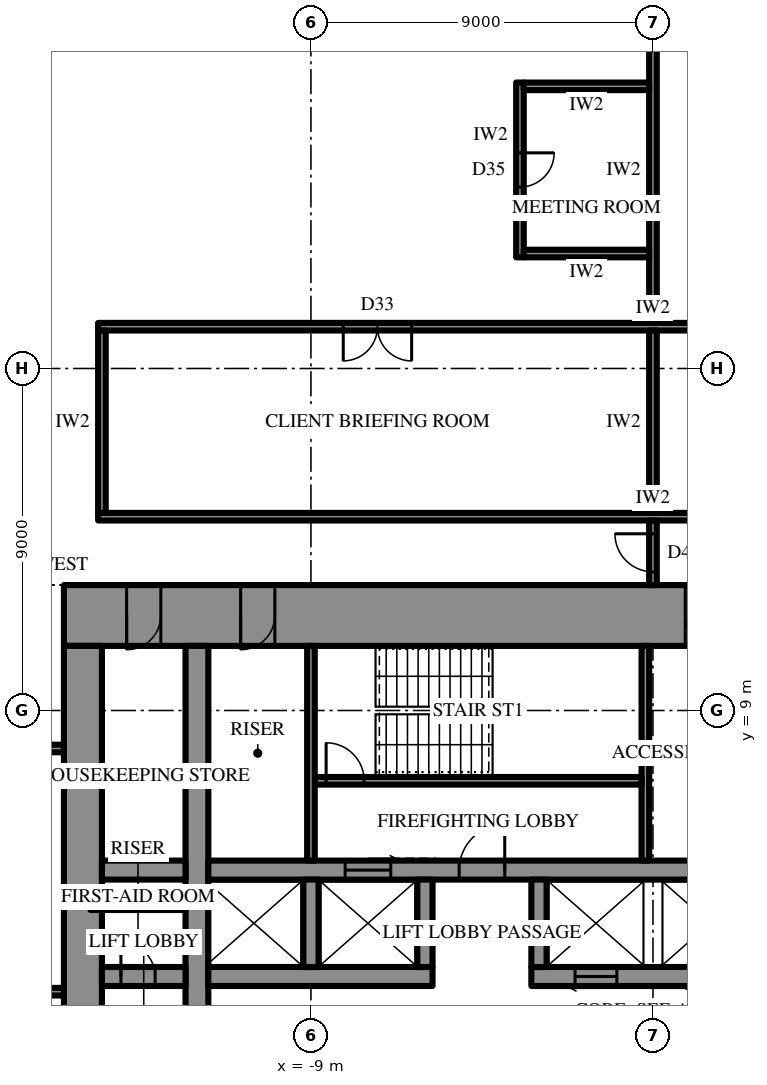
"""IFC4 building model, lengths in metres.
Left out: names, types, materials, properties, quantities, classifications, styles, units other than length and angle.
Written with IfcOpenShell. Run it as: python <this file> out.ifc"""

import sys

from ifc_helpers import new_model, si_unit, direction, frame, frame_2d, origin, place, context, subcontext, project, spatial, polyline, rectangle, outline, extrude, element, fill, save


model = new_model("IFC4")
c1 = context("Model", 3, precision=1e-05, world=origin(), true_north=direction((0.0, 1.0)))
c2 = subcontext(c1, "Body", "Model", "MODEL_VIEW")
j1 = project(units=[si_unit("LENGTHUNIT", "METRE"), si_unit("PLANEANGLEUNIT", "RADIAN")], contexts=[c1])
p1 = place(None, origin())
s1 = spatial("IfcSite", under=j1, at=p1, CompositionType="ELEMENT")
p2 = place(p1, origin())
s2 = spatial("IfcBuilding", under=s1, at=p2, CompositionType="ELEMENT")
p3 = place(p2, frame((0.0, 0.0, 215.5)))
s3 = spatial("IfcBuildingStorey", under=s2, at=p3, CompositionType="ELEMENT", Elevation=215.5)
p4 = place(p3, frame((-15.5, 11.5, 0.0), z_axis=(0.0, 0.0, 1.0), x_axis=(1.0, 0.0, 0.0)))
e1 = element("IfcWall", 1, at=p4, inside=s3, PredefinedType="SHEAR", context=c2, shape_type="SweptSolid", body=[
    extrude(rectangle(XDim=31.0, YDim=1.6, at=frame_2d((15.5, 0.0))), origin(), (0.0, 0.0, 1.0), 4.2),
])
p5 = place(p4, frame((16.35, 0.0, 0.0)))
e2 = element("IfcOpeningElement", 2, at=p5, cuts=e1, PredefinedType="OPENING", context=c2, shape_type="SweptSolid", body=[
    extrude(rectangle(XDim=0.9, YDim=2.2, at=frame_2d((0.45, 1.1))), frame((0.0, 0.81, 0.0), z_axis=(0.0, -1.0, 0.0), x_axis=(1.0, 0.0, 0.0)), (0.0, 0.0, 1.0), 1.62),
])
p6 = place(p4, frame((19.35, 0.0, 0.0)))
e3 = element("IfcOpeningElement", 3, at=p6, cuts=e1, PredefinedType="OPENING", context=c2, shape_type="SweptSolid", body=[
    extrude(rectangle(XDim=0.9, YDim=2.2, at=frame_2d((0.45, 1.1))), frame((0.0, 0.81, 0.0), z_axis=(0.0, -1.0, 0.0), x_axis=(1.0, 0.0, 0.0)), (0.0, 0.0, 1.0), 1.62),
])
p7 = place(p4, frame((22.4, 0.0, 0.0)))
e4 = element("IfcOpeningElement", 4, at=p7, cuts=e1, PredefinedType="OPENING", context=c2, shape_type="SweptSolid", body=[
    extrude(rectangle(XDim=1.0, YDim=2.2, at=frame_2d((0.5, 1.1))), frame((0.0, 0.81, 0.0), z_axis=(0.0, -1.0, 0.0), x_axis=(1.0, 0.0, 0.0)), (0.0, 0.0, 1.0), 1.62),
])
p8 = place(p4, frame((1.65, 0.0, 0.0)))
e5 = element("IfcOpeningElement", 5, at=p8, cuts=e1, PredefinedType="OPENING", context=c2, shape_type="SweptSolid", body=[
    extrude(rectangle(XDim=0.9, YDim=2.2, at=frame_2d((0.45, 1.1))), frame((0.0, 0.81, 0.0), z_axis=(0.0, -1.0, 0.0), x_axis=(1.0, 0.0, 0.0)), (0.0, 0.0, 1.0), 1.62),
])
p9 = place(p4, frame((4.65, 0.0, 0.0)))
e6 = element("IfcOpeningElement", 6, at=p9, cuts=e1, PredefinedType="OPENING", context=c2, shape_type="SweptSolid", body=[
    extrude(rectangle(XDim=0.9, YDim=2.2, at=frame_2d((0.45, 1.1))), frame((0.0, 0.81, 0.0), z_axis=(0.0, -1.0, 0.0), x_axis=(1.0, 0.0, 0.0)), (0.0, 0.0, 1.0), 1.62),
])
p10 = place(p4, frame((25.45, 0.0, 0.0)))
e7 = element("IfcOpeningElement", 7, at=p10, cuts=e1, PredefinedType="OPENING", context=c2, shape_type="SweptSolid", body=[
    extrude(rectangle(XDim=0.9, YDim=2.2, at=frame_2d((0.45, 1.1))), frame((0.0, 0.81, 0.0), z_axis=(0.0, -1.0, 0.0), x_axis=(1.0, 0.0, 0.0)), (0.0, 0.0, 1.0), 1.62),
])
p11 = place(p4, frame((28.45, 0.0, 0.0)))
e8 = element("IfcOpeningElement", 8, at=p11, cuts=e1, PredefinedType="OPENING", context=c2, shape_type="SweptSolid", body=[
    extrude(rectangle(XDim=0.9, YDim=2.2, at=frame_2d((0.45, 1.1))), frame((0.0, 0.81, 0.0), z_axis=(0.0, -1.0, 0.0), x_axis=(1.0, 0.0, 0.0)), (0.0, 0.0, 1.0), 1.62),
])
p12 = place(p3, frame((-15.0, 10.7, 0.0), z_axis=(0.0, 0.0, 1.0), x_axis=(0.0, -1.0, 0.0)))
e9 = element("IfcWall", 9, at=p12, inside=s3, PredefinedType="SHEAR", context=c2, shape_type="SweptSolid", body=[
    extrude(rectangle(XDim=21.4, YDim=1.0, at=frame_2d((10.7, 0.0))), origin(), (0.0, 0.0, 1.0), 4.2),
])
p13 = place(p12, frame((9.8, 0.0, 0.0)))
e10 = element("IfcOpeningElement", 10, at=p13, cuts=e9, PredefinedType="OPENING", context=c2, shape_type="SweptSolid", body=[
    extrude(rectangle(XDim=1.8, YDim=2.4, at=frame_2d((0.9, 1.2))), frame((0.0, 0.51, 0.0), z_axis=(0.0, -1.0, 0.0), x_axis=(1.0, 0.0, 0.0)), (0.0, 0.0, 1.0), 1.02),
])
p14 = place(p3, frame((-12.0, -10.7, 0.0), z_axis=(0.0, 0.0, 1.0), x_axis=(0.0, 1.0, 0.0)))
e11 = element("IfcWall", 11, at=p14, inside=s3, PredefinedType="SHEAR", context=c2, shape_type="SweptSolid", body=[
    extrude(rectangle(XDim=21.4, YDim=0.6, at=frame_2d((10.7, 0.0))), origin(), (0.0, 0.0, 1.0), 4.2),
])
p15 = place(p14, frame((9.8, 0.0, 0.0)))
e12 = element("IfcOpeningElement", 12, at=p15, cuts=e11, PredefinedType="OPENING", context=c2, shape_type="SweptSolid", body=[
    extrude(rectangle(XDim=1.8, YDim=2.4, at=frame_2d((0.9, 1.2))), frame((0.0, 0.31, 0.0), z_axis=(0.0, -1.0, 0.0), x_axis=(1.0, 0.0, 0.0)), (0.0, 0.0, 1.0), 0.62),
])
p16 = place(p3, frame((-14.5, 2.0, 0.0), z_axis=(0.0, 0.0, 1.0), x_axis=(1.0, 0.0, 0.0)))
e13 = element("IfcWall", 13, at=p16, inside=s3, PredefinedType="SHEAR", context=c2, shape_type="SweptSolid", body=[
    extrude(rectangle(XDim=2.2, YDim=0.5, at=frame_2d((1.1, 0.0))), origin(), (0.0, 0.0, 1.0), 4.2),
])
p17 = place(p16, frame((0.5, 0.0, 0.0)))
e14 = element("IfcOpeningElement", 14, at=p17, cuts=e13, PredefinedType="OPENING", context=c2, shape_type="SweptSolid", body=[
    extrude(rectangle(XDim=0.9, YDim=2.2, at=frame_2d((0.45, 1.1))), frame((0.0, 0.26, 0.0), z_axis=(0.0, -1.0, 0.0), x_axis=(1.0, 0.0, 0.0)), (0.0, 0.0, 1.0), 0.52),
])
p18 = place(p3, frame((-11.7, 2.0, 0.0), z_axis=(0.0, 0.0, 1.0), x_axis=(1.0, 0.0, 0.0)))
e15 = element("IfcWall", 15, at=p18, inside=s3, PredefinedType="SHEAR", context=c2, shape_type="SweptSolid", body=[
    extrude(rectangle(XDim=5.9, YDim=0.5, at=frame_2d((2.95, 0.0))), origin(), (0.0, 0.0, 1.0), 4.2),
])
p19 = place(p3, frame((-3.2, 2.0, 0.0), z_axis=(0.0, 0.0, 1.0), x_axis=(1.0, 0.0, 0.0)))
e16 = element("IfcWall", 16, at=p19, inside=s3, PredefinedType="SHEAR", context=c2, shape_type="SweptSolid", body=[
    extrude(rectangle(XDim=14.9, YDim=0.5, at=frame_2d((7.45, 0.0))), origin(), (0.0, 0.0, 1.0), 4.2),
])
p20 = place(p19, frame((1.15, 0.0, 0.0)))
e17 = element("IfcOpeningElement", 17, at=p20, cuts=e16, PredefinedType="OPENING", context=c2, shape_type="SweptSolid", body=[
    extrude(rectangle(XDim=1.1, YDim=2.2, at=frame_2d((0.55, 1.1))), frame((0.0, 0.26, 0.0), z_axis=(0.0, -1.0, 0.0), x_axis=(1.0, 0.0, 0.0)), (0.0, 0.0, 1.0), 0.52),
])
p21 = place(p19, frame((4.15, 0.0, 0.0)))
e18 = element("IfcOpeningElement", 18, at=p21, cuts=e16, PredefinedType="OPENING", context=c2, shape_type="SweptSolid", body=[
    extrude(rectangle(XDim=1.1, YDim=2.2, at=frame_2d((0.55, 1.1))), frame((0.0, 0.26, 0.0), z_axis=(0.0, -1.0, 0.0), x_axis=(1.0, 0.0, 0.0)), (0.0, 0.0, 1.0), 0.52),
])
p22 = place(p19, frame((7.15, 0.0, 0.0)))
e19 = element("IfcOpeningElement", 19, at=p22, cuts=e16, PredefinedType="OPENING", context=c2, shape_type="SweptSolid", body=[
    extrude(rectangle(XDim=1.1, YDim=2.2, at=frame_2d((0.55, 1.1))), frame((0.0, 0.26, 0.0), z_axis=(0.0, -1.0, 0.0), x_axis=(1.0, 0.0, 0.0)), (0.0, 0.0, 1.0), 0.52),
])
p23 = place(p19, frame((10.15, 0.0, 0.0)))
e20 = element("IfcOpeningElement", 20, at=p23, cuts=e16, PredefinedType="OPENING", context=c2, shape_type="SweptSolid", body=[
    extrude(rectangle(XDim=1.1, YDim=2.2, at=frame_2d((0.55, 1.1))), frame((0.0, 0.26, 0.0), z_axis=(0.0, -1.0, 0.0), x_axis=(1.0, 0.0, 0.0)), (0.0, 0.0, 1.0), 0.52),
])
p24 = place(p3, frame((-14.5, 4.8, 0.0), z_axis=(0.0, 0.0, 1.0), x_axis=(1.0, 0.0, 0.0)))
e21 = element("IfcWall", 21, at=p24, inside=s3, PredefinedType="SHEAR", context=c2, shape_type="SweptSolid", body=[
    extrude(rectangle(XDim=2.2, YDim=0.5, at=frame_2d((1.1, 0.0))), origin(), (0.0, 0.0, 1.0), 4.2),
])
p25 = place(p3, frame((-11.7, 4.8, 0.0), z_axis=(0.0, 0.0, 1.0), x_axis=(1.0, 0.0, 0.0)))
e22 = element("IfcWall", 22, at=p25, inside=s3, PredefinedType="SHEAR", context=c2, shape_type="SweptSolid", body=[
    extrude(rectangle(XDim=23.4, YDim=0.5, at=frame_2d((11.7, 0.0))), origin(), (0.0, 0.0, 1.0), 4.2),
])
p26 = place(p25, frame((6.6, 0.0, 0.0)))
e23 = element("IfcOpeningElement", 23, at=p26, cuts=e22, PredefinedType="OPENING", context=c2, shape_type="SweptSolid", body=[
    extrude(rectangle(XDim=1.2, YDim=2.2, at=frame_2d((0.6, 1.1))), frame((0.0, 0.26, 0.0), z_axis=(0.0, -1.0, 0.0), x_axis=(1.0, 0.0, 0.0)), (0.0, 0.0, 1.0), 0.52),
])
p27 = place(p25, frame((3.6, 0.0, 0.0)))
e24 = element("IfcOpeningElement", 24, at=p27, cuts=e22, PredefinedType="OPENING", context=c2, shape_type="SweptSolid", body=[
    extrude(rectangle(XDim=1.2, YDim=2.2, at=frame_2d((0.6, 1.1))), frame((0.0, 0.26, 0.0), z_axis=(0.0, -1.0, 0.0), x_axis=(1.0, 0.0, 0.0)), (0.0, 0.0, 1.0), 0.52),
])
for number, where, z_axis, x_axis in (
    (25, (-9.0, 2.25, 0.0), (0.0, 0.0, 1.0), (0.0, 1.0, 0.0)),
    (26, (-6.0, 2.25, 0.0), (0.0, 0.0, 1.0), (0.0, 1.0, 0.0)),
    (27, (-3.0, 2.25, 0.0), (0.0, 0.0, 1.0), (0.0, 1.0, 0.0)),
):
    element("IfcWall", number, at=place(p3, frame(where, z_axis=z_axis, x_axis=x_axis)), inside=s3, PredefinedType="SHEAR", context=c2, shape_type="SweptSolid", body=[
        extrude(rectangle(XDim=2.3, YDim=0.4, at=frame_2d((1.15, 0.0))), origin(), (0.0, 0.0, 1.0), 4.2),
    ])
p28 = place(p3, frame((-0.2, 5.05, 0.0), z_axis=(0.0, 0.0, 1.0), x_axis=(0.0, 1.0, 0.0)))
e28 = element("IfcWall", 28, at=p28, inside=s3, PredefinedType="SHEAR", context=c2, shape_type="SweptSolid", body=[
    extrude(rectangle(XDim=5.65, YDim=0.2, at=frame_2d((2.825, 0.0))), origin(), (0.0, 0.0, 1.0), 4.2),
])
p29 = place(p3, frame((-8.9, 7.15, 0.0), z_axis=(0.0, 0.0, 1.0), x_axis=(1.0, 0.0, 0.0)))
e29 = element("IfcWall", 29, at=p29, inside=s3, PredefinedType="SHEAR", context=c2, shape_type="SweptSolid", body=[
    extrude(rectangle(XDim=8.6, YDim=0.2, at=frame_2d((4.3, 0.0))), origin(), (0.0, 0.0, 1.0), 4.2),
])
p30 = place(p29, frame((0.3, 0.0, 0.0)))
e30 = element("IfcOpeningElement", 30, at=p30, cuts=e29, PredefinedType="OPENING", context=c2, shape_type="SweptSolid", body=[
    extrude(rectangle(XDim=1.0, YDim=2.2, at=frame_2d((0.5, 1.1))), frame((0.0, 0.11, 0.0), z_axis=(0.0, -1.0, 0.0), x_axis=(1.0, 0.0, 0.0)), (0.0, 0.0, 1.0), 0.22),
])
p31 = place(p3, origin())
e31 = element("IfcWall", 31, at=p31, inside=s3, PredefinedType="SOLIDWALL", context=c2, shape_type="SweptSolid", body=[
    extrude(outline(polyline([(-13.856, 29.0), (-15.15, 28.83), (-16.356, 28.33), (-17.392, 27.536), (-18.187, 26.5), (-17.84, 26.3), (-17.109, 27.253), (-16.156, 27.984), (-15.047, 28.443), (-13.856, 28.6), (-13.856, 29.0)])), origin(), (0.0, 0.0, 1.0), 2.0),
])
p32 = place(p3, frame((-9.0, 5.05, 0.0), z_axis=(0.0, 0.0, 1.0), x_axis=(0.0, 1.0, 0.0)))
e32 = element("IfcWall", 32, at=p32, inside=s3, PredefinedType="PARTITIONING", context=c2, shape_type="SweptSolid", body=[
    extrude(rectangle(XDim=5.65, YDim=0.2, at=frame_2d((2.825, 0.0))), origin(), (0.0, 0.0, 1.0), 4.0),
])
p33 = place(p3, frame((-14.8, 3.85, 0.0), z_axis=(0.0, 0.0, 1.0), x_axis=(1.0, 0.0, 0.0)))
e33 = element("IfcWall", 33, at=p33, inside=s3, PredefinedType="PARTITIONING", context=c2, shape_type="SweptSolid", body=[
    extrude(rectangle(XDim=2.5, YDim=0.2, at=frame_2d((1.25, 0.0))), origin(), (0.0, 0.0, 1.0), 4.0),
])
p34 = place(p3, frame((-14.6, 14.1, 0.0), z_axis=(0.0, 0.0, 1.0), x_axis=(1.0, 0.0, 0.0)))
e34 = element("IfcWall", 34, at=p34, inside=s3, PredefinedType="PARTITIONING", context=c2, shape_type="SweptSolid", body=[
    extrude(rectangle(XDim=29.2, YDim=0.2, at=frame_2d((14.6, 0.0))), origin(), (0.0, 0.0, 1.0), 4.0),
])
p35 = place(p3, frame((-14.6, 19.1, 0.0), z_axis=(0.0, 0.0, 1.0), x_axis=(1.0, 0.0, 0.0)))
e35 = element("IfcWall", 35, at=p35, inside=s3, PredefinedType="PARTITIONING", context=c2, shape_type="SweptSolid", body=[
    extrude(rectangle(XDim=29.2, YDim=0.2, at=frame_2d((14.6, 0.0))), origin(), (0.0, 0.0, 1.0), 4.0),
])
p36 = place(p35, frame((6.45, 0.0, 0.0)))
e36 = element("IfcOpeningElement", 36, at=p36, cuts=e35, PredefinedType="OPENING", context=c2, shape_type="SweptSolid", body=[
    extrude(rectangle(XDim=1.8, YDim=2.4, at=frame_2d((0.9, 1.2))), frame((0.0, 0.11, 0.0), z_axis=(0.0, -1.0, 0.0), x_axis=(1.0, 0.0, 0.0)), (0.0, 0.0, 1.0), 0.22),
])
p37 = place(p35, frame((20.95, 0.0, 0.0)))
e37 = element("IfcOpeningElement", 37, at=p37, cuts=e35, PredefinedType="OPENING", context=c2, shape_type="SweptSolid", body=[
    extrude(rectangle(XDim=1.8, YDim=2.4, at=frame_2d((0.9, 1.2))), frame((0.0, 0.11, 0.0), z_axis=(0.0, -1.0, 0.0), x_axis=(1.0, 0.0, 0.0)), (0.0, 0.0, 1.0), 0.22),
])
p38 = place(p3, frame((-14.5, 14.2, 0.0), z_axis=(0.0, 0.0, 1.0), x_axis=(0.0, 1.0, 0.0)))
e38 = element("IfcWall", 38, at=p38, inside=s3, PredefinedType="PARTITIONING", context=c2, shape_type="SweptSolid", body=[
    extrude(rectangle(XDim=4.8, YDim=0.2, at=frame_2d((2.4, 0.0))), origin(), (0.0, 0.0, 1.0), 4.0),
])
p39 = place(p3, frame((0.0, 14.2, 0.0), z_axis=(0.0, 0.0, 1.0), x_axis=(0.0, 1.0, 0.0)))
e39 = element("IfcWall", 39, at=p39, inside=s3, PredefinedType="PARTITIONING", context=c2, shape_type="SweptSolid", body=[
    extrude(rectangle(XDim=4.8, YDim=0.2, at=frame_2d((2.4, 0.0))), origin(), (0.0, 0.0, 1.0), 2.992),
])
p40 = place(p3, frame((-15.5, 1.6, 0.0), z_axis=(0.0, 0.0, 1.0), x_axis=(-1.0, 0.0, 0.0)))
e40 = element("IfcWall", 40, at=p40, inside=s3, PredefinedType="PARTITIONING", context=c2, shape_type="SweptSolid", body=[
    extrude(rectangle(XDim=11.7, YDim=0.2, at=frame_2d((5.85, 0.0))), origin(), (0.0, 0.0, 1.0), 4.0),
])
p41 = place(p40, frame((5.35, 0.0, 0.0)))
e41 = element("IfcOpeningElement", 41, at=p41, cuts=e40, PredefinedType="OPENING", context=c2, shape_type="SweptSolid", body=[
    extrude(rectangle(XDim=1.0, YDim=2.2, at=frame_2d((0.5, 1.1))), frame((0.0, 0.11, 0.0), z_axis=(0.0, -1.0, 0.0), x_axis=(1.0, 0.0, 0.0)), (0.0, 0.0, 1.0), 0.22),
])
p42 = place(p3, frame((0.0, 12.3, 0.0), z_axis=(0.0, 0.0, 1.0), x_axis=(0.0, 1.0, 0.0)))
e42 = element("IfcWall", 42, at=p42, inside=s3, PredefinedType="PARTITIONING", context=c2, shape_type="SweptSolid", body=[
    extrude(rectangle(XDim=1.7, YDim=0.2, at=frame_2d((0.85, 0.0))), origin(), (0.0, 0.0, 1.0), 2.992),
])
p43 = place(p42, frame((0.35, 0.0, 0.0)))
e43 = element("IfcOpeningElement", 43, at=p43, cuts=e42, PredefinedType="OPENING", context=c2, shape_type="SweptSolid", body=[
    extrude(rectangle(XDim=1.0, YDim=2.2, at=frame_2d((0.5, 1.1))), frame((0.0, 0.11, 0.0), z_axis=(0.0, -1.0, 0.0), x_axis=(1.0, 0.0, 0.0)), (0.0, 0.0, 1.0), 0.22),
])
p44 = place(p3, frame((0.0, 19.2, 0.0), z_axis=(0.0, 0.0, 1.0), x_axis=(0.0, 1.0, 0.0)))
e44 = element("IfcWall", 44, at=p44, inside=s3, PredefinedType="PARTITIONING", context=c2, shape_type="SweptSolid", body=[
    extrude(rectangle(XDim=8.05, YDim=0.2, at=frame_2d((4.025, 0.0))), origin(), (0.0, 0.0, 1.0), 2.992),
])
p45 = place(p3, frame((-15.5, 8.0, 0.0), z_axis=(0.0, 0.0, 1.0), x_axis=(-1.0, 0.0, 0.0)))
e45 = element("IfcWall", 45, at=p45, inside=s3, PredefinedType="PARTITIONING", context=c2, shape_type="SweptSolid", body=[
    extrude(rectangle(XDim=13.113, YDim=0.2, at=frame_2d((6.557, 0.0))), origin(), (0.0, 0.0, 1.0), 4.0),
])
p46 = place(p45, frame((0.811, 0.0, 0.0)))
e46 = element("IfcOpeningElement", 46, at=p46, cuts=e45, PredefinedType="OPENING", context=c2, shape_type="SweptSolid", body=[
    extrude(rectangle(XDim=1.0, YDim=2.2, at=frame_2d((0.5, 1.1))), frame((0.0, 0.11, 0.0), z_axis=(0.0, -1.0, 0.0), x_axis=(1.0, 0.0, 0.0)), (0.0, 0.0, 1.0), 0.22),
])
p47 = place(p3, frame((-3.5, 20.925, 0.0), z_axis=(0.0, 0.0, 1.0), x_axis=(0.0, 1.0, 0.0)))
e47 = element("IfcWall", 47, at=p47, inside=s3, PredefinedType="PARTITIONING", context=c2, shape_type="SweptSolid", body=[
    extrude(rectangle(XDim=4.6, YDim=0.2, at=frame_2d((2.3, 0.0))), origin(), (0.0, 0.0, 1.0), 4.0),
])
p48 = place(p47, frame((1.85, 0.0, 0.0)))
e48 = element("IfcOpeningElement", 48, at=p48, cuts=e47, PredefinedType="OPENING", context=c2, shape_type="SweptSolid", body=[
    extrude(rectangle(XDim=0.9, YDim=2.2, at=frame_2d((0.45, 1.1))), frame((0.0, 0.11, 0.0), z_axis=(0.0, -1.0, 0.0), x_axis=(1.0, 0.0, 0.0)), (0.0, 0.0, 1.0), 0.22),
])
for number, where, z_axis, x_axis in (
    (49, (-0.1, 21.025, 0.0), (0.0, 0.0, 1.0), (-1.0, 0.0, 0.0)),
    (50, (-0.1, 25.425, 0.0), (0.0, 0.0, 1.0), (-1.0, 0.0, 0.0)),
):
    element("IfcWall", number, at=place(p3, frame(where, z_axis=z_axis, x_axis=x_axis)), inside=s3, PredefinedType="PARTITIONING", context=c2, shape_type="SweptSolid", body=[
        extrude(rectangle(XDim=3.3, YDim=0.2, at=frame_2d((1.65, 0.0))), origin(), (0.0, 0.0, 1.0), 4.0),
    ])
p49 = place(p26, origin())
e51 = element("IfcDoor", 51, at=p49, inside=s3, OperationType="SINGLE_SWING_LEFT", PredefinedType="DOOR", context=c2, shape_type="SweptSolid", body=[
    extrude(rectangle(XDim=1.2, YDim=2.2, at=frame_2d((0.6, 1.1))), frame((0.0, 0.025, 0.0), z_axis=(0.0, -1.0, 0.0), x_axis=(1.0, 0.0, 0.0)), (0.0, 0.0, 1.0), 0.05),
])
fill(e23, e51)
p50 = place(p30, origin())
e52 = element("IfcDoor", 52, at=p50, inside=s3, OperationType="SINGLE_SWING_RIGHT", PredefinedType="DOOR", context=c2, shape_type="SweptSolid", body=[
    extrude(rectangle(XDim=1.0, YDim=2.2, at=frame_2d((0.5, 1.1))), frame((0.0, 0.025, 0.0), z_axis=(0.0, -1.0, 0.0), x_axis=(1.0, 0.0, 0.0)), (0.0, 0.0, 1.0), 0.05),
])
fill(e30, e52)
p51 = place(p5, frame((0.9, 0.0, 0.0), z_axis=(0.0, 0.0, 1.0), x_axis=(-1.0, 0.0, 0.0)))
e53 = element("IfcDoor", 53, at=p51, inside=s3, OperationType="SINGLE_SWING_RIGHT", PredefinedType="DOOR", context=c2, shape_type="SweptSolid", body=[
    extrude(rectangle(XDim=0.9, YDim=2.2, at=frame_2d((0.45, 1.1))), frame((0.0, 0.025, 0.0), z_axis=(0.0, -1.0, 0.0), x_axis=(1.0, 0.0, 0.0)), (0.0, 0.0, 1.0), 0.05),
])
fill(e2, e53)
p52 = place(p8, frame((0.9, 0.0, 0.0), z_axis=(0.0, 0.0, 1.0), x_axis=(-1.0, 0.0, 0.0)))
e54 = element("IfcDoor", 54, at=p52, inside=s3, OperationType="SINGLE_SWING_LEFT", PredefinedType="DOOR", context=c2, shape_type="SweptSolid", body=[
    extrude(rectangle(XDim=0.9, YDim=2.2, at=frame_2d((0.45, 1.1))), frame((0.0, 0.025, 0.0), z_axis=(0.0, -1.0, 0.0), x_axis=(1.0, 0.0, 0.0)), (0.0, 0.0, 1.0), 0.05),
])
fill(e5, e54)
p53 = place(p9, frame((0.9, 0.0, 0.0), z_axis=(0.0, 0.0, 1.0), x_axis=(-1.0, 0.0, 0.0)))
e55 = element("IfcDoor", 55, at=p53, inside=s3, OperationType="SINGLE_SWING_LEFT", PredefinedType="DOOR", context=c2, shape_type="SweptSolid", body=[
    extrude(rectangle(XDim=0.9, YDim=2.2, at=frame_2d((0.45, 1.1))), frame((0.0, 0.025, 0.0), z_axis=(0.0, -1.0, 0.0), x_axis=(1.0, 0.0, 0.0)), (0.0, 0.0, 1.0), 0.05),
])
fill(e6, e55)
p54 = place(p17, origin())
e56 = element("IfcDoor", 56, at=p54, inside=s3, OperationType="SINGLE_SWING_RIGHT", PredefinedType="DOOR", context=c2, shape_type="SweptSolid", body=[
    extrude(rectangle(XDim=0.9, YDim=2.2, at=frame_2d((0.45, 1.1))), frame((0.0, 0.025, 0.0), z_axis=(0.0, -1.0, 0.0), x_axis=(1.0, 0.0, 0.0)), (0.0, 0.0, 1.0), 0.05),
])
fill(e14, e56)
p55 = place(p27, origin())
e57 = element("IfcDoor", 57, at=p55, inside=s3, OperationType="SLIDING_TO_LEFT", PredefinedType="DOOR", context=c2, shape_type="SweptSolid", body=[
    extrude(rectangle(XDim=1.2, YDim=2.2, at=frame_2d((0.6, 1.1))), frame((0.0, 0.025, 0.0), z_axis=(0.0, -1.0, 0.0), x_axis=(1.0, 0.0, 0.0)), (0.0, 0.0, 1.0), 0.05),
])
fill(e24, e57)
p56 = place(p20, frame((1.1, 0.0, 0.0), z_axis=(0.0, 0.0, 1.0), x_axis=(-1.0, 0.0, 0.0)))
e58 = element("IfcDoor", 58, at=p56, inside=s3, OperationType="SLIDING_TO_LEFT", PredefinedType="DOOR", context=c2, shape_type="SweptSolid", body=[
    extrude(rectangle(XDim=1.1, YDim=2.2, at=frame_2d((0.55, 1.1))), frame((0.0, 0.025, 0.0), z_axis=(0.0, -1.0, 0.0), x_axis=(1.0, 0.0, 0.0)), (0.0, 0.0, 1.0), 0.05),
])
fill(e17, e58)
p57 = place(p36, frame((1.8, 0.0, 0.0), z_axis=(0.0, 0.0, 1.0), x_axis=(-1.0, 0.0, 0.0)))
e59 = element("IfcDoor", 59, at=p57, inside=s3, OperationType="DOUBLE_DOOR_SINGLE_SWING", PredefinedType="DOOR", context=c2, shape_type="SweptSolid", body=[
    extrude(rectangle(XDim=1.8, YDim=2.4, at=frame_2d((0.9, 1.2))), frame((0.0, 0.025, 0.0), z_axis=(0.0, -1.0, 0.0), x_axis=(1.0, 0.0, 0.0)), (0.0, 0.0, 1.0), 0.05),
])
fill(e36, e59)
p58 = place(p43, origin())
e60 = element("IfcDoor", 60, at=p58, inside=s3, OperationType="SINGLE_SWING_LEFT", PredefinedType="DOOR", context=c2, shape_type="SweptSolid", body=[
    extrude(rectangle(XDim=1.0, YDim=2.2, at=frame_2d((0.5, 1.1))), frame((0.0, 0.025, 0.0), z_axis=(0.0, -1.0, 0.0), x_axis=(1.0, 0.0, 0.0)), (0.0, 0.0, 1.0), 0.05),
])
fill(e43, e60)
p59 = place(p48, frame((0.9, 0.0, 0.0), z_axis=(0.0, 0.0, 1.0), x_axis=(-1.0, 0.0, 0.0)))
e61 = element("IfcDoor", 61, at=p59, inside=s3, OperationType="SINGLE_SWING_RIGHT", PredefinedType="DOOR", context=c2, shape_type="SweptSolid", body=[
    extrude(rectangle(XDim=0.9, YDim=2.2, at=frame_2d((0.45, 1.1))), frame((0.0, 0.025, 0.0), z_axis=(0.0, -1.0, 0.0), x_axis=(1.0, 0.0, 0.0)), (0.0, 0.0, 1.0), 0.05),
])
fill(e48, e61)
save(model, sys.argv[1])
